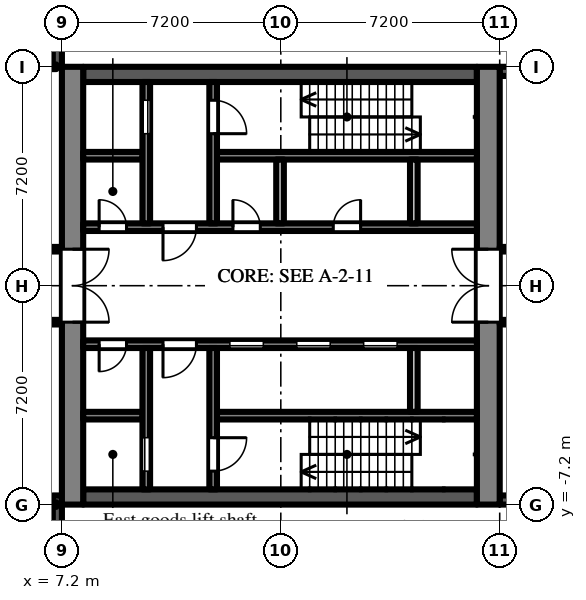
"""IFC4 building model, lengths in metres.
Left out: names, types, materials, properties, quantities, classifications, styles, units other than length and angle.
Written with IfcOpenShell. Run it as: python <this file> out.ifc"""

import sys

from ifc_helpers import new_model, si_unit, direction, frame, frame_2d, origin, place, context, subcontext, project, spatial, rectangle, extrude, element, fill, save


model = new_model("IFC4")
c1 = context("Model", 3, precision=1e-05, world=origin(), true_north=direction((0.0, 1.0)))
c2 = subcontext(c1, "Body", "Model", "MODEL_VIEW")
j1 = project(units=[si_unit("LENGTHUNIT", "METRE"), si_unit("PLANEANGLEUNIT", "RADIAN")], contexts=[c1])
p1 = place(None, origin())
s1 = spatial("IfcSite", under=j1, at=p1, CompositionType="ELEMENT")
p2 = place(p1, origin())
s2 = spatial("IfcBuilding", under=s1, at=p2, CompositionType="ELEMENT")
p3 = place(p2, frame((0.0, 0.0, 62.7)))
s3 = spatial("IfcBuildingStorey", under=s2, at=p3, CompositionType="ELEMENT", Elevation=62.7)
for number, where, z_axis, x_axis in (
    (1, (21.6, -7.05, 0.0), (0.0, 0.0, 1.0), (1.0, 0.0, 0.0)),
    (2, (24.3, 7.05, 0.0), (0.0, 0.0, 1.0), (-1.0, 0.0, 0.0)),
):
    element("IfcWall", number, at=place(p3, frame(where, z_axis=z_axis, x_axis=x_axis)), inside=s3, PredefinedType="SOLIDWALL", context=c2, shape_type="SweptSolid", body=[
        extrude(rectangle(XDim=2.7, YDim=0.3, at=frame_2d((1.35, 0.0))), origin(), (0.0, 0.0, 1.0), 3.3),
    ])
p4 = place(p3, frame((7.05, 7.2, 0.0), z_axis=(0.0, 0.0, 1.0), x_axis=(0.0, 1.0, 0.0)))
e3 = element("IfcWall", 3, at=p4, inside=s3, PredefinedType="SOLIDWALL", context=c2, shape_type="SweptSolid", body=[
    extrude(rectangle(XDim=7.2, YDim=0.3, at=frame_2d((3.6, 0.0))), origin(), (0.0, 0.0, 1.0), 3.775),
])
p5 = place(p3, frame((7.05, -14.4, 0.0), z_axis=(0.0, 0.0, 1.0), x_axis=(0.0, 1.0, 0.0)))
e4 = element("IfcWall", 4, at=p5, inside=s3, PredefinedType="SOLIDWALL", context=c2, shape_type="SweptSolid", body=[
    extrude(rectangle(XDim=7.5, YDim=0.3, at=frame_2d((3.75, 0.0))), origin(), (0.0, 0.0, 1.0), 3.775),
])
p6 = place(p3, frame((7.55, -7.2, 0.0), z_axis=(0.0, 0.0, 1.0), x_axis=(0.0, 1.0, 0.0)))
e5 = element("IfcWall", 5, at=p6, inside=s3, PredefinedType="SHEAR", context=c2, shape_type="SweptSolid", body=[
    extrude(rectangle(XDim=14.4, YDim=0.7, at=frame_2d((7.2, 0.0))), origin(), (0.0, 0.0, 1.0), 3.775),
])
p7 = place(p6, frame((6.0, 0.0, 0.0)))
e6 = element("IfcOpeningElement", 6, at=p7, cuts=e5, PredefinedType="OPENING", context=c2, shape_type="SweptSolid", body=[
    extrude(rectangle(XDim=2.4, YDim=2.2, at=frame_2d((1.2, 1.1))), frame((0.0, 0.36, 0.0), z_axis=(0.0, -1.0, 0.0), x_axis=(1.0, 0.0, 0.0)), (0.0, 0.0, 1.0), 0.72),
])
p8 = place(p3, frame((21.225, -7.2, 0.0), z_axis=(0.0, 0.0, 1.0), x_axis=(0.0, 1.0, 0.0)))
e7 = element("IfcWall", 7, at=p8, inside=s3, PredefinedType="SHEAR", context=c2, shape_type="SweptSolid", body=[
    extrude(rectangle(XDim=14.4, YDim=0.75, at=frame_2d((7.2, 0.0))), origin(), (0.0, 0.0, 1.0), 3.775),
])
p9 = place(p8, frame((6.0, 0.0, 0.0)))
e8 = element("IfcOpeningElement", 8, at=p9, cuts=e7, PredefinedType="OPENING", context=c2, shape_type="SweptSolid", body=[
    extrude(rectangle(XDim=2.4, YDim=2.2, at=frame_2d((1.2, 1.1))), frame((0.0, 0.385, 0.0), z_axis=(0.0, -1.0, 0.0), x_axis=(1.0, 0.0, 0.0)), (0.0, 0.0, 1.0), 0.77),
])
p10 = place(p3, frame((7.9, 6.95, 0.0), z_axis=(0.0, 0.0, 1.0), x_axis=(1.0, 0.0, 0.0)))
e9 = element("IfcWall", 9, at=p10, inside=s3, PredefinedType="SHEAR", context=c2, shape_type="SweptSolid", body=[
    extrude(rectangle(XDim=12.95, YDim=0.5, at=frame_2d((6.475, 0.0))), origin(), (0.0, 0.0, 1.0), 3.775),
])
p11 = place(p3, frame((7.9, 1.925, 0.0), z_axis=(0.0, 0.0, 1.0), x_axis=(1.0, 0.0, 0.0)))
e10 = element("IfcWall", 10, at=p11, inside=s3, PredefinedType="SHEAR", context=c2, shape_type="SweptSolid", body=[
    extrude(rectangle(XDim=12.95, YDim=0.25, at=frame_2d((6.475, 0.0))), origin(), (0.0, 0.0, 1.0), 3.775),
])
p12 = place(p11, frame((0.525, 0.0, 0.0)))
e11 = element("IfcOpeningElement", 11, at=p12, cuts=e10, PredefinedType="OPENING", context=c2, shape_type="SweptSolid", body=[
    extrude(rectangle(XDim=0.9, YDim=2.1, at=frame_2d((0.45, 1.05))), frame((0.0, 0.135, 0.0), z_axis=(0.0, -1.0, 0.0), x_axis=(1.0, 0.0, 0.0)), (0.0, 0.0, 1.0), 0.27),
])
p13 = place(p11, frame((2.625, 0.0, 0.0)))
e12 = element("IfcOpeningElement", 12, at=p13, cuts=e10, PredefinedType="OPENING", context=c2, shape_type="SweptSolid", body=[
    extrude(rectangle(XDim=1.1, YDim=2.1, at=frame_2d((0.55, 1.05))), frame((0.0, 0.135, 0.0), z_axis=(0.0, -1.0, 0.0), x_axis=(1.0, 0.0, 0.0)), (0.0, 0.0, 1.0), 0.27),
])
p14 = place(p11, frame((4.925, 0.0, 0.0)))
e13 = element("IfcOpeningElement", 13, at=p14, cuts=e10, PredefinedType="OPENING", context=c2, shape_type="SweptSolid", body=[
    extrude(rectangle(XDim=0.9, YDim=2.1, at=frame_2d((0.45, 1.05))), frame((0.0, 0.135, 0.0), z_axis=(0.0, -1.0, 0.0), x_axis=(1.0, 0.0, 0.0)), (0.0, 0.0, 1.0), 0.27),
])
p15 = place(p11, frame((8.225, 0.0, 0.0)))
e14 = element("IfcOpeningElement", 14, at=p15, cuts=e10, PredefinedType="OPENING", context=c2, shape_type="SweptSolid", body=[
    extrude(rectangle(XDim=0.9, YDim=2.1, at=frame_2d((0.45, 1.05))), frame((0.0, 0.135, 0.0), z_axis=(0.0, -1.0, 0.0), x_axis=(1.0, 0.0, 0.0)), (0.0, 0.0, 1.0), 0.27),
])
p16 = place(p3, frame((7.9, 4.275, 0.0), z_axis=(0.0, 0.0, 1.0), x_axis=(1.0, 0.0, 0.0)))
e15 = element("IfcWall", 15, at=p16, inside=s3, PredefinedType="SHEAR", context=c2, shape_type="SweptSolid", body=[
    extrude(rectangle(XDim=1.95, YDim=0.25, at=frame_2d((0.975, 0.0))), origin(), (0.0, 0.0, 1.0), 3.775),
])
p17 = place(p3, frame((12.3, 4.275, 0.0), z_axis=(0.0, 0.0, 1.0), x_axis=(1.0, 0.0, 0.0)))
e16 = element("IfcWall", 16, at=p17, inside=s3, PredefinedType="SHEAR", context=c2, shape_type="SweptSolid", body=[
    extrude(rectangle(XDim=8.55, YDim=0.25, at=frame_2d((4.275, 0.0))), origin(), (0.0, 0.0, 1.0), 3.775),
])
p18 = place(p3, frame((9.975, 2.05, 0.0), z_axis=(0.0, 0.0, 1.0), x_axis=(0.0, 1.0, 0.0)))
e17 = element("IfcWall", 17, at=p18, inside=s3, PredefinedType="SHEAR", context=c2, shape_type="SweptSolid", body=[
    extrude(rectangle(XDim=4.65, YDim=0.25, at=frame_2d((2.325, 0.0))), origin(), (0.0, 0.0, 1.0), 3.775),
])
p19 = place(p18, frame((2.95, 0.0, 0.0)))
e18 = element("IfcOpeningElement", 18, at=p19, cuts=e17, PredefinedType="OPENING", context=c2, shape_type="SweptSolid", body=[
    extrude(rectangle(XDim=1.1, YDim=2.1, at=frame_2d((0.55, 1.05))), frame((0.0, 0.135, 0.0), z_axis=(0.0, -1.0, 0.0), x_axis=(1.0, 0.0, 0.0)), (0.0, 0.0, 1.0), 0.27),
])
p20 = place(p3, frame((12.175, 2.05, 0.0), z_axis=(0.0, 0.0, 1.0), x_axis=(0.0, 1.0, 0.0)))
e19 = element("IfcWall", 19, at=p20, inside=s3, PredefinedType="SHEAR", context=c2, shape_type="SweptSolid", body=[
    extrude(rectangle(XDim=4.65, YDim=0.25, at=frame_2d((2.325, 0.0))), origin(), (0.0, 0.0, 1.0), 3.775),
])
p21 = place(p20, frame((2.95, 0.0, 0.0)))
e20 = element("IfcOpeningElement", 20, at=p21, cuts=e19, PredefinedType="OPENING", context=c2, shape_type="SweptSolid", body=[
    extrude(rectangle(XDim=1.1, YDim=2.1, at=frame_2d((0.55, 1.05))), frame((0.0, 0.135, 0.0), z_axis=(0.0, -1.0, 0.0), x_axis=(1.0, 0.0, 0.0)), (0.0, 0.0, 1.0), 0.27),
])
for number, where, z_axis, x_axis in (
    (21, (14.375, 2.05, 0.0), (0.0, 0.0, 1.0), (0.0, 1.0, 0.0)),
    (22, (18.775, 2.05, 0.0), (0.0, 0.0, 1.0), (0.0, 1.0, 0.0)),
):
    element("IfcWall", number, at=place(p3, frame(where, z_axis=z_axis, x_axis=x_axis)), inside=s3, PredefinedType="PARTITIONING", context=c2, shape_type="SweptSolid", body=[
        extrude(rectangle(XDim=2.1, YDim=0.25, at=frame_2d((1.05, 0.0))), origin(), (0.0, 0.0, 1.0), 3.775),
    ])
p22 = place(p3, frame((7.9, -6.95, 0.0), z_axis=(0.0, 0.0, 1.0), x_axis=(1.0, 0.0, 0.0)))
e23 = element("IfcWall", 23, at=p22, inside=s3, PredefinedType="SHEAR", context=c2, shape_type="SweptSolid", body=[
    extrude(rectangle(XDim=12.95, YDim=0.5, at=frame_2d((6.475, 0.0))), origin(), (0.0, 0.0, 1.0), 3.775),
])
p23 = place(p3, frame((7.9, -1.925, 0.0), z_axis=(0.0, 0.0, 1.0), x_axis=(1.0, 0.0, 0.0)))
e24 = element("IfcWall", 24, at=p23, inside=s3, PredefinedType="SHEAR", context=c2, shape_type="SweptSolid", body=[
    extrude(rectangle(XDim=12.95, YDim=0.25, at=frame_2d((6.475, 0.0))), origin(), (0.0, 0.0, 1.0), 3.775),
])
p24 = place(p23, frame((4.825, 0.0, 0.0)))
e25 = element("IfcOpeningElement", 25, at=p24, cuts=e24, PredefinedType="OPENING", context=c2, shape_type="SweptSolid", body=[
    extrude(rectangle(XDim=1.1, YDim=2.1, at=frame_2d((0.55, 1.05))), frame((0.0, 0.135, 0.0), z_axis=(0.0, -1.0, 0.0), x_axis=(1.0, 0.0, 0.0)), (0.0, 0.0, 1.0), 0.27),
])
p25 = place(p23, frame((7.025, 0.0, 0.0)))
e26 = element("IfcOpeningElement", 26, at=p25, cuts=e24, PredefinedType="OPENING", context=c2, shape_type="SweptSolid", body=[
    extrude(rectangle(XDim=1.1, YDim=2.1, at=frame_2d((0.55, 1.05))), frame((0.0, 0.135, 0.0), z_axis=(0.0, -1.0, 0.0), x_axis=(1.0, 0.0, 0.0)), (0.0, 0.0, 1.0), 0.27),
])
p26 = place(p23, frame((9.225, 0.0, 0.0)))
e27 = element("IfcOpeningElement", 27, at=p26, cuts=e24, PredefinedType="OPENING", context=c2, shape_type="SweptSolid", body=[
    extrude(rectangle(XDim=1.1, YDim=2.1, at=frame_2d((0.55, 1.05))), frame((0.0, 0.135, 0.0), z_axis=(0.0, -1.0, 0.0), x_axis=(1.0, 0.0, 0.0)), (0.0, 0.0, 1.0), 0.27),
])
p27 = place(p23, frame((0.525, 0.0, 0.0)))
e28 = element("IfcOpeningElement", 28, at=p27, cuts=e24, PredefinedType="OPENING", context=c2, shape_type="SweptSolid", body=[
    extrude(rectangle(XDim=0.9, YDim=2.1, at=frame_2d((0.45, 1.05))), frame((0.0, 0.135, 0.0), z_axis=(0.0, -1.0, 0.0), x_axis=(1.0, 0.0, 0.0)), (0.0, 0.0, 1.0), 0.27),
])
p28 = place(p23, frame((2.625, 0.0, 0.0)))
e29 = element("IfcOpeningElement", 29, at=p28, cuts=e24, PredefinedType="OPENING", context=c2, shape_type="SweptSolid", body=[
    extrude(rectangle(XDim=1.1, YDim=2.1, at=frame_2d((0.55, 1.05))), frame((0.0, 0.135, 0.0), z_axis=(0.0, -1.0, 0.0), x_axis=(1.0, 0.0, 0.0)), (0.0, 0.0, 1.0), 0.27),
])
p29 = place(p3, frame((7.9, -4.275, 0.0), z_axis=(0.0, 0.0, 1.0), x_axis=(1.0, 0.0, 0.0)))
e30 = element("IfcWall", 30, at=p29, inside=s3, PredefinedType="SHEAR", context=c2, shape_type="SweptSolid", body=[
    extrude(rectangle(XDim=1.95, YDim=0.25, at=frame_2d((0.975, 0.0))), origin(), (0.0, 0.0, 1.0), 3.775),
])
p30 = place(p3, frame((12.3, -4.275, 0.0), z_axis=(0.0, 0.0, 1.0), x_axis=(1.0, 0.0, 0.0)))
e31 = element("IfcWall", 31, at=p30, inside=s3, PredefinedType="SHEAR", context=c2, shape_type="SweptSolid", body=[
    extrude(rectangle(XDim=8.55, YDim=0.25, at=frame_2d((4.275, 0.0))), origin(), (0.0, 0.0, 1.0), 3.775),
])
p31 = place(p3, frame((9.975, -2.05, 0.0), z_axis=(0.0, 0.0, 1.0), x_axis=(0.0, -1.0, 0.0)))
e32 = element("IfcWall", 32, at=p31, inside=s3, PredefinedType="SHEAR", context=c2, shape_type="SweptSolid", body=[
    extrude(rectangle(XDim=4.65, YDim=0.25, at=frame_2d((2.325, 0.0))), origin(), (0.0, 0.0, 1.0), 3.775),
])
p32 = place(p31, frame((2.95, 0.0, 0.0)))
e33 = element("IfcOpeningElement", 33, at=p32, cuts=e32, PredefinedType="OPENING", context=c2, shape_type="SweptSolid", body=[
    extrude(rectangle(XDim=1.1, YDim=2.1, at=frame_2d((0.55, 1.05))), frame((0.0, 0.135, 0.0), z_axis=(0.0, -1.0, 0.0), x_axis=(1.0, 0.0, 0.0)), (0.0, 0.0, 1.0), 0.27),
])
p33 = place(p3, frame((12.175, -2.05, 0.0), z_axis=(0.0, 0.0, 1.0), x_axis=(0.0, -1.0, 0.0)))
e34 = element("IfcWall", 34, at=p33, inside=s3, PredefinedType="SHEAR", context=c2, shape_type="SweptSolid", body=[
    extrude(rectangle(XDim=4.65, YDim=0.25, at=frame_2d((2.325, 0.0))), origin(), (0.0, 0.0, 1.0), 3.775),
])
p34 = place(p33, frame((2.95, 0.0, 0.0)))
e35 = element("IfcOpeningElement", 35, at=p34, cuts=e34, PredefinedType="OPENING", context=c2, shape_type="SweptSolid", body=[
    extrude(rectangle(XDim=1.1, YDim=2.1, at=frame_2d((0.55, 1.05))), frame((0.0, 0.135, 0.0), z_axis=(0.0, -1.0, 0.0), x_axis=(1.0, 0.0, 0.0)), (0.0, 0.0, 1.0), 0.27),
])
p35 = place(p3, frame((18.775, -2.05, 0.0), z_axis=(0.0, 0.0, 1.0), x_axis=(0.0, -1.0, 0.0)))
e36 = element("IfcWall", 36, at=p35, inside=s3, PredefinedType="PARTITIONING", context=c2, shape_type="SweptSolid", body=[
    extrude(rectangle(XDim=2.1, YDim=0.25, at=frame_2d((1.05, 0.0))), origin(), (0.0, 0.0, 1.0), 3.775),
])
p36 = place(p3, frame((1.275, -1.2, 0.0), z_axis=(0.0, 0.0, 1.0), x_axis=(1.0, 0.0, 0.0)))
e37 = element("IfcWall", 37, at=p36, inside=s3, PredefinedType="PARTITIONING", context=c2, shape_type="SweptSolid", body=[
    extrude(rectangle(XDim=5.925, YDim=0.15, at=frame_2d((2.962, 0.0))), origin(), (0.0, 0.0, 1.0), 3.775),
])
p37 = place(p36, frame((0.1, 0.0, 0.0)))
e38 = element("IfcOpeningElement", 38, at=p37, cuts=e37, PredefinedType="OPENING", context=c2, shape_type="SweptSolid", body=[
    extrude(rectangle(XDim=0.9, YDim=2.1, at=frame_2d((0.45, 1.05))), frame((0.0, 0.085, 0.0), z_axis=(0.0, -1.0, 0.0), x_axis=(1.0, 0.0, 0.0)), (0.0, 0.0, 1.0), 0.17),
])
p38 = place(p36, frame((4.075, 0.0, 0.0)))
e39 = element("IfcOpeningElement", 39, at=p38, cuts=e37, PredefinedType="OPENING", context=c2, shape_type="SweptSolid", body=[
    extrude(rectangle(XDim=1.2, YDim=2.1, at=frame_2d((0.6, 1.05))), frame((0.0, 0.085, 0.0), z_axis=(0.0, -1.0, 0.0), x_axis=(1.0, 0.0, 0.0)), (0.0, 0.0, 1.0), 0.17),
])
p39 = place(p3, frame((1.275, 1.2, 0.0), z_axis=(0.0, 0.0, 1.0), x_axis=(1.0, 0.0, 0.0)))
e40 = element("IfcWall", 40, at=p39, inside=s3, PredefinedType="PARTITIONING", context=c2, shape_type="SweptSolid", body=[
    extrude(rectangle(XDim=5.925, YDim=0.15, at=frame_2d((2.962, 0.0))), origin(), (0.0, 0.0, 1.0), 3.775),
])
p40 = place(p39, frame((3.875, 0.0, 0.0)))
e41 = element("IfcOpeningElement", 41, at=p40, cuts=e40, PredefinedType="OPENING", context=c2, shape_type="SweptSolid", body=[
    extrude(rectangle(XDim=1.2, YDim=2.1, at=frame_2d((0.6, 1.05))), frame((0.0, 0.085, 0.0), z_axis=(0.0, -1.0, 0.0), x_axis=(1.0, 0.0, 0.0)), (0.0, 0.0, 1.0), 0.17),
])
p41 = place(p3, frame((21.6, -1.2, 0.0), z_axis=(0.0, 0.0, 1.0), x_axis=(1.0, 0.0, 0.0)))
e42 = element("IfcWall", 42, at=p41, inside=s3, PredefinedType="PARTITIONING", context=c2, shape_type="SweptSolid", body=[
    extrude(rectangle(XDim=14.9, YDim=0.15, at=frame_2d((7.45, 0.0))), origin(), (0.0, 0.0, 1.0), 3.775),
])
p42 = place(p41, frame((1.2, 0.0, 0.0)))
e43 = element("IfcOpeningElement", 43, at=p42, cuts=e42, PredefinedType="OPENING", context=c2, shape_type="SweptSolid", body=[
    extrude(rectangle(XDim=1.2, YDim=2.1, at=frame_2d((0.6, 1.05))), frame((0.0, 0.085, 0.0), z_axis=(0.0, -1.0, 0.0), x_axis=(1.0, 0.0, 0.0)), (0.0, 0.0, 1.0), 0.17),
])
p43 = place(p41, frame((6.3, 0.0, 0.0)))
e44 = element("IfcOpeningElement", 44, at=p43, cuts=e42, PredefinedType="OPENING", context=c2, shape_type="SweptSolid", body=[
    extrude(rectangle(XDim=1.8, YDim=2.1, at=frame_2d((0.9, 1.05))), frame((0.0, 0.085, 0.0), z_axis=(0.0, -1.0, 0.0), x_axis=(1.0, 0.0, 0.0)), (0.0, 0.0, 1.0), 0.17),
])
p44 = place(p41, frame((11.95, 0.0, 0.0)))
e45 = element("IfcOpeningElement", 45, at=p44, cuts=e42, PredefinedType="OPENING", context=c2, shape_type="SweptSolid", body=[
    extrude(rectangle(XDim=1.8, YDim=2.1, at=frame_2d((0.9, 1.05))), frame((0.0, 0.085, 0.0), z_axis=(0.0, -1.0, 0.0), x_axis=(1.0, 0.0, 0.0)), (0.0, 0.0, 1.0), 0.17),
])
p45 = place(p3, frame((21.6, 1.2, 0.0), z_axis=(0.0, 0.0, 1.0), x_axis=(1.0, 0.0, 0.0)))
e46 = element("IfcWall", 46, at=p45, inside=s3, PredefinedType="PARTITIONING", context=c2, shape_type="SweptSolid", body=[
    extrude(rectangle(XDim=14.9, YDim=0.15, at=frame_2d((7.45, 0.0))), origin(), (0.0, 0.0, 1.0), 3.775),
])
p46 = place(p45, frame((1.2, 0.0, 0.0)))
e47 = element("IfcOpeningElement", 47, at=p46, cuts=e46, PredefinedType="OPENING", context=c2, shape_type="SweptSolid", body=[
    extrude(rectangle(XDim=1.2, YDim=2.1, at=frame_2d((0.6, 1.05))), frame((0.0, 0.085, 0.0), z_axis=(0.0, -1.0, 0.0), x_axis=(1.0, 0.0, 0.0)), (0.0, 0.0, 1.0), 0.17),
])
p47 = place(p45, frame((9.05, 0.0, 0.0)))
e48 = element("IfcOpeningElement", 48, at=p47, cuts=e46, PredefinedType="OPENING", context=c2, shape_type="SweptSolid", body=[
    extrude(rectangle(XDim=0.9, YDim=2.1, at=frame_2d((0.45, 1.05))), frame((0.0, 0.085, 0.0), z_axis=(0.0, -1.0, 0.0), x_axis=(1.0, 0.0, 0.0)), (0.0, 0.0, 1.0), 0.17),
])
p48 = place(p45, frame((11.95, 0.0, 0.0)))
e49 = element("IfcOpeningElement", 49, at=p48, cuts=e46, PredefinedType="OPENING", context=c2, shape_type="SweptSolid", body=[
    extrude(rectangle(XDim=1.8, YDim=2.1, at=frame_2d((0.9, 1.05))), frame((0.0, 0.085, 0.0), z_axis=(0.0, -1.0, 0.0), x_axis=(1.0, 0.0, 0.0)), (0.0, 0.0, 1.0), 0.17),
])
for number, where, z_axis, x_axis in (
    (50, (3.75, -7.2, 0.0), (0.0, 0.0, 1.0), (1.0, 0.0, 0.0)),
    (51, (3.75, 7.2, 0.0), (0.0, 0.0, 1.0), (1.0, 0.0, 0.0)),
):
    element("IfcWall", number, at=place(p3, frame(where, z_axis=z_axis, x_axis=x_axis)), inside=s3, PredefinedType="PARTITIONING", context=c2, shape_type="SweptSolid", body=[
        extrude(rectangle(XDim=3.27, YDim=0.15, at=frame_2d((1.635, 0.0))), origin(), (0.0, 0.0, 1.0), 3.3),
    ])
p49 = place(p24, origin())
e52 = element("IfcDoor", 52, at=p49, inside=s3, OperationType="SLIDING_TO_LEFT", PredefinedType="DOOR", context=c2, shape_type="SweptSolid", body=[
    extrude(rectangle(XDim=1.1, YDim=2.1, at=frame_2d((0.55, 1.05))), frame((0.0, 0.025, 0.0), z_axis=(0.0, -1.0, 0.0), x_axis=(1.0, 0.0, 0.0)), (0.0, 0.0, 1.0), 0.05),
])
fill(e25, e52)
p50 = place(p25, origin())
e53 = element("IfcDoor", 53, at=p50, inside=s3, OperationType="SLIDING_TO_LEFT", PredefinedType="DOOR", context=c2, shape_type="SweptSolid", body=[
    extrude(rectangle(XDim=1.1, YDim=2.1, at=frame_2d((0.55, 1.05))), frame((0.0, 0.025, 0.0), z_axis=(0.0, -1.0, 0.0), x_axis=(1.0, 0.0, 0.0)), (0.0, 0.0, 1.0), 0.05),
])
fill(e26, e53)
p51 = place(p26, origin())
e54 = element("IfcDoor", 54, at=p51, inside=s3, OperationType="SLIDING_TO_LEFT", PredefinedType="DOOR", context=c2, shape_type="SweptSolid", body=[
    extrude(rectangle(XDim=1.1, YDim=2.1, at=frame_2d((0.55, 1.05))), frame((0.0, 0.025, 0.0), z_axis=(0.0, -1.0, 0.0), x_axis=(1.0, 0.0, 0.0)), (0.0, 0.0, 1.0), 0.05),
])
fill(e27, e54)
p52 = place(p19, origin())
e55 = element("IfcDoor", 55, at=p52, inside=s3, OperationType="SLIDING_TO_LEFT", PredefinedType="DOOR", context=c2, shape_type="SweptSolid", body=[
    extrude(rectangle(XDim=1.1, YDim=2.1, at=frame_2d((0.55, 1.05))), frame((0.0, 0.025, 0.0), z_axis=(0.0, -1.0, 0.0), x_axis=(1.0, 0.0, 0.0)), (0.0, 0.0, 1.0), 0.05),
])
fill(e18, e55)
p53 = place(p32, origin())
e56 = element("IfcDoor", 56, at=p53, inside=s3, OperationType="SLIDING_TO_LEFT", PredefinedType="DOOR", context=c2, shape_type="SweptSolid", body=[
    extrude(rectangle(XDim=1.1, YDim=2.1, at=frame_2d((0.55, 1.05))), frame((0.0, 0.025, 0.0), z_axis=(0.0, -1.0, 0.0), x_axis=(1.0, 0.0, 0.0)), (0.0, 0.0, 1.0), 0.05),
])
fill(e33, e56)
p54 = place(p21, frame((1.1, 0.0, 0.0), z_axis=(0.0, 0.0, 1.0), x_axis=(-1.0, 0.0, 0.0)))
e57 = element("IfcDoor", 57, at=p54, inside=s3, OperationType="SINGLE_SWING_RIGHT", PredefinedType="DOOR", context=c2, shape_type="SweptSolid", body=[
    extrude(rectangle(XDim=1.1, YDim=2.1, at=frame_2d((0.55, 1.05))), frame((0.0, 0.025, 0.0), z_axis=(0.0, -1.0, 0.0), x_axis=(1.0, 0.0, 0.0)), (0.0, 0.0, 1.0), 0.05),
])
fill(e20, e57)
p55 = place(p34, origin())
e58 = element("IfcDoor", 58, at=p55, inside=s3, OperationType="SINGLE_SWING_LEFT", PredefinedType="DOOR", context=c2, shape_type="SweptSolid", body=[
    extrude(rectangle(XDim=1.1, YDim=2.1, at=frame_2d((0.55, 1.05))), frame((0.0, 0.025, 0.0), z_axis=(0.0, -1.0, 0.0), x_axis=(1.0, 0.0, 0.0)), (0.0, 0.0, 1.0), 0.05),
])
fill(e35, e58)
p56 = place(p12, origin())
e59 = element("IfcDoor", 59, at=p56, inside=s3, OperationType="SINGLE_SWING_LEFT", PredefinedType="DOOR", context=c2, shape_type="SweptSolid", body=[
    extrude(rectangle(XDim=0.9, YDim=2.1, at=frame_2d((0.45, 1.05))), frame((0.0, 0.025, 0.0), z_axis=(0.0, -1.0, 0.0), x_axis=(1.0, 0.0, 0.0)), (0.0, 0.0, 1.0), 0.05),
])
fill(e11, e59)
p57 = place(p27, frame((0.9, 0.0, 0.0), z_axis=(0.0, 0.0, 1.0), x_axis=(-1.0, 0.0, 0.0)))
e60 = element("IfcDoor", 60, at=p57, inside=s3, OperationType="SINGLE_SWING_RIGHT", PredefinedType="DOOR", context=c2, shape_type="SweptSolid", body=[
    extrude(rectangle(XDim=0.9, YDim=2.1, at=frame_2d((0.45, 1.05))), frame((0.0, 0.025, 0.0), z_axis=(0.0, -1.0, 0.0), x_axis=(1.0, 0.0, 0.0)), (0.0, 0.0, 1.0), 0.05),
])
fill(e28, e60)
p58 = place(p13, frame((1.1, 0.0, 0.0), z_axis=(0.0, 0.0, 1.0), x_axis=(-1.0, 0.0, 0.0)))
e61 = element("IfcDoor", 61, at=p58, inside=s3, OperationType="SINGLE_SWING_RIGHT", PredefinedType="DOOR", context=c2, shape_type="SweptSolid", body=[
    extrude(rectangle(XDim=1.1, YDim=2.1, at=frame_2d((0.55, 1.05))), frame((0.0, 0.025, 0.0), z_axis=(0.0, -1.0, 0.0), x_axis=(1.0, 0.0, 0.0)), (0.0, 0.0, 1.0), 0.05),
])
fill(e12, e61)
p59 = place(p28, frame((1.1, 0.0, 0.0), z_axis=(0.0, 0.0, 1.0), x_axis=(-1.0, 0.0, 0.0)))
e62 = element("IfcDoor", 62, at=p59, inside=s3, OperationType="SINGLE_SWING_RIGHT", PredefinedType="DOOR", context=c2, shape_type="SweptSolid", body=[
    extrude(rectangle(XDim=1.1, YDim=2.1, at=frame_2d((0.55, 1.05))), frame((0.0, 0.025, 0.0), z_axis=(0.0, -1.0, 0.0), x_axis=(1.0, 0.0, 0.0)), (0.0, 0.0, 1.0), 0.05),
])
fill(e29, e62)
p60 = place(p7, frame((2.4, 0.0, 0.0), z_axis=(0.0, 0.0, 1.0), x_axis=(-1.0, 0.0, 0.0)))
e63 = element("IfcDoor", 63, at=p60, inside=s3, OperationType="DOUBLE_DOOR_DOUBLE_SWING", PredefinedType="DOOR", context=c2, shape_type="SweptSolid", body=[
    extrude(rectangle(XDim=2.4, YDim=2.2, at=frame_2d((1.2, 1.1))), frame((0.0, 0.025, 0.0), z_axis=(0.0, -1.0, 0.0), x_axis=(1.0, 0.0, 0.0)), (0.0, 0.0, 1.0), 0.05),
])
fill(e6, e63)
p61 = place(p9, origin())
e64 = element("IfcDoor", 64, at=p61, inside=s3, OperationType="DOUBLE_DOOR_DOUBLE_SWING", PredefinedType="DOOR", context=c2, shape_type="SweptSolid", body=[
    extrude(rectangle(XDim=2.4, YDim=2.2, at=frame_2d((1.2, 1.1))), frame((0.0, 0.025, 0.0), z_axis=(0.0, -1.0, 0.0), x_axis=(1.0, 0.0, 0.0)), (0.0, 0.0, 1.0), 0.05),
])
fill(e8, e64)
p62 = place(p14, origin())
e65 = element("IfcDoor", 65, at=p62, inside=s3, OperationType="SINGLE_SWING_LEFT", PredefinedType="DOOR", context=c2, shape_type="SweptSolid", body=[
    extrude(rectangle(XDim=0.9, YDim=2.1, at=frame_2d((0.45, 1.05))), frame((0.0, 0.025, 0.0), z_axis=(0.0, -1.0, 0.0), x_axis=(1.0, 0.0, 0.0)), (0.0, 0.0, 1.0), 0.05),
])
fill(e13, e65)
p63 = place(p15, origin())
e66 = element("IfcDoor", 66, at=p63, inside=s3, OperationType="SINGLE_SWING_RIGHT", PredefinedType="DOOR", context=c2, shape_type="SweptSolid", body=[
    extrude(rectangle(XDim=0.9, YDim=2.1, at=frame_2d((0.45, 1.05))), frame((0.0, 0.025, 0.0), z_axis=(0.0, -1.0, 0.0), x_axis=(1.0, 0.0, 0.0)), (0.0, 0.0, 1.0), 0.05),
])
fill(e14, e66)
save(model, sys.argv[1])
